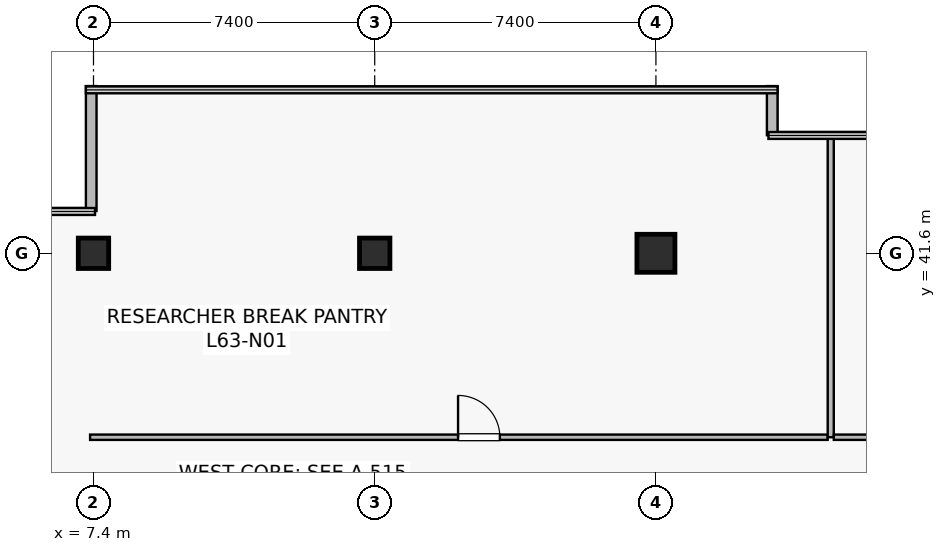
"""IFC4 building model, lengths in metres.
Left out: names, types, materials, properties, quantities, classifications, styles, units other than length and angle.
Written with IfcOpenShell. Run it as: python <this file> out.ifc"""

import sys

from ifc_helpers import new_model, si_unit, direction, frame, frame_2d, origin, origin_2d, place, context, subcontext, project, spatial, rectangle, extrude, source, transform, mapped, element, fill, save


model = new_model("IFC4")
c1 = context("Model", 3, precision=1e-05, world=origin(), true_north=direction((0.0, 1.0)))
c2 = subcontext(c1, "Body", "Model", "MODEL_VIEW")
j1 = project(units=[si_unit("LENGTHUNIT", "METRE"), si_unit("PLANEANGLEUNIT", "RADIAN")], contexts=[c1])
p1 = place(None, origin())
s1 = spatial("IfcSite", under=j1, at=p1, CompositionType="ELEMENT")
p2 = place(p1, origin())
s2 = spatial("IfcBuilding", under=s1, at=p2, CompositionType="ELEMENT")
p3 = place(p2, frame((0.0, 0.0, 262.9)))
s3 = spatial("IfcBuildingStorey", under=s2, at=p3, CompositionType="ELEMENT", Elevation=262.9)
m1 = source(origin(), c2, "Body", "SweptSolid", [
    extrude(rectangle(XDim=0.8, YDim=0.8, at=origin_2d()), origin(), (0.0, 0.0, 1.0), 4.1),
])
p4 = place(p3, frame((14.8, 41.6, 0.0), z_axis=(0.0, 0.0, 1.0), x_axis=(1.0, 0.0, 0.0)))
e1 = element("IfcColumn", 1, at=p4, inside=s3, PredefinedType="COLUMN", context=c2, shape_type="MappedRepresentation", body=[
    mapped(m1, transform((0.0, 0.0, 0.0), scale=1.0)),
])
m2 = source(origin(), c2, "Body", "SweptSolid", [
    extrude(rectangle(XDim=1.0, YDim=1.0, at=origin_2d()), origin(), (0.0, 0.0, 1.0), 4.1),
])
p5 = place(p3, frame((22.2, 41.6, 0.0), z_axis=(0.0, 0.0, 1.0), x_axis=(1.0, 0.0, 0.0)))
e2 = element("IfcColumn", 2, at=p5, inside=s3, PredefinedType="COLUMN", context=c2, shape_type="MappedRepresentation", body=[
    mapped(m2, transform((0.0, 0.0, 0.0), scale=1.0)),
])
p6 = place(p3, frame((7.4, 41.6, 0.0), z_axis=(0.0, 0.0, 1.0), x_axis=(1.0, 0.0, 0.0)))
e3 = element("IfcColumn", 3, at=p6, inside=s3, PredefinedType="COLUMN", context=c2, shape_type="MappedRepresentation", body=[
    mapped(m1, transform((0.0, 0.0, 0.0), scale=1.0)),
])
p7 = place(p3, frame((25.26, 44.707, 0.0), z_axis=(0.0, 0.0, 1.0), x_axis=(0.0, 1.0, 0.0)))
e4 = element("IfcWall", 4, at=p7, inside=s3, PredefinedType="STANDARD", context=c2, shape_type="SweptSolid", body=[
    extrude(rectangle(XDim=1.293, YDim=0.28, at=frame_2d((0.646, 0.0))), origin(), (0.0, 0.0, 1.0), 3.8),
])
p8 = place(p3, frame((7.34, 46.0, 0.0), z_axis=(0.0, 0.0, 1.0), x_axis=(0.0, -1.0, 0.0)))
e5 = element("IfcWall", 5, at=p8, inside=s3, PredefinedType="STANDARD", context=c2, shape_type="SweptSolid", body=[
    extrude(rectangle(XDim=3.288, YDim=0.28, at=frame_2d((1.644, 0.0))), origin(), (0.0, 0.0, 1.0), 3.8),
])
p9 = place(p3, frame((7.31, 36.76, 0.0), z_axis=(0.0, 0.0, 1.0), x_axis=(1.0, 0.0, 0.0)))
e6 = element("IfcWall", 6, at=p9, inside=s3, PredefinedType="PARTITIONING", context=c2, shape_type="SweptSolid", body=[
    extrude(rectangle(XDim=19.41, YDim=0.14, at=frame_2d((9.705, 0.0))), origin(), (0.0, 0.0, 1.0), 3.197),
])
p10 = place(p9, frame((9.683, 0.0, 0.0)))
e7 = element("IfcOpeningElement", 7, at=p10, cuts=e6, PredefinedType="OPENING", context=c2, shape_type="SweptSolid", body=[
    extrude(rectangle(XDim=1.1, YDim=2.18, at=frame_2d((0.55, 1.09))), frame((0.0, 0.08, 0.0), z_axis=(0.0, -1.0, 0.0), x_axis=(1.0, 0.0, 0.0)), (0.0, 0.0, 1.0), 0.16),
])
p11 = place(p3, frame((26.8, 36.76, 0.0), z_axis=(0.0, 0.0, 1.0), x_axis=(0.0, 1.0, 0.0)))
e8 = element("IfcWall", 8, at=p11, inside=s3, PredefinedType="PARTITIONING", context=c2, shape_type="SweptSolid", body=[
    extrude(rectangle(XDim=7.93, YDim=0.16, at=frame_2d((3.965, 0.0))), origin(), (0.0, 0.0, 1.0), 3.135),
])
p12 = place(p3, frame((26.88, 36.76, 0.0), z_axis=(0.0, 0.0, 1.0), x_axis=(1.0, 0.0, 0.0)))
e9 = element("IfcWall", 9, at=p12, inside=s3, PredefinedType="PARTITIONING", context=c2, shape_type="SweptSolid", body=[
    extrude(rectangle(XDim=24.24, YDim=0.14, at=frame_2d((12.12, 0.0))), origin(), (0.0, 0.0, 1.0), 3.197),
])
p13 = place(p12, frame((9.55, 0.0, 0.0)))
e10 = element("IfcOpeningElement", 10, at=p13, cuts=e9, PredefinedType="OPENING", context=c2, shape_type="SweptSolid", body=[
    extrude(rectangle(XDim=1.1, YDim=2.18, at=frame_2d((0.55, 1.09))), frame((0.0, 0.08, 0.0), z_axis=(0.0, -1.0, 0.0), x_axis=(1.0, 0.0, 0.0)), (0.0, 0.0, 1.0), 0.16),
])
m3 = source(origin(), c2, "Body", "SweptSolid", [
    extrude(rectangle(XDim=1.1, YDim=2.18, at=frame_2d((0.55, 1.09))), frame((0.0, 0.025, 0.0), z_axis=(0.0, -1.0, 0.0), x_axis=(1.0, 0.0, 0.0)), (0.0, 0.0, 1.0), 0.05),
])
p14 = place(p10, origin())
e11 = element("IfcDoor", 11, at=p14, inside=s3, OperationType="SINGLE_SWING_LEFT", PredefinedType="DOOR", context=c2, shape_type="MappedRepresentation", body=[
    mapped(m3, transform((0.0, 0.0, 0.0), scale=1.0)),
])
fill(e7, e11)
save(model, sys.argv[1])
